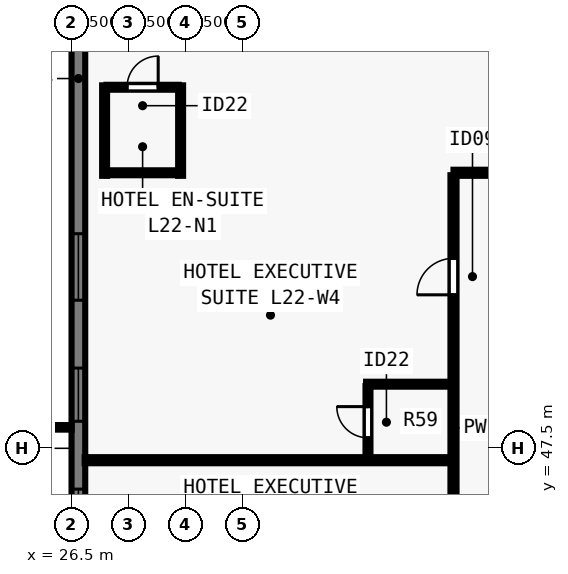
"""IFC4 building model, lengths in metres.
Left out: names, types, materials, properties, quantities, classifications, styles, units other than length and angle.
Written with IfcOpenShell. Run it as: python <this file> out.ifc"""

import sys

from ifc_helpers import new_model, si_unit, direction, frame, frame_2d, origin, place, context, subcontext, project, spatial, rectangle, extrude, element, fill, save


model = new_model("IFC4")
c1 = context("Model", 3, precision=1e-05, world=origin(), true_north=direction((0.0, 1.0)))
c2 = subcontext(c1, "Body", "Model", "MODEL_VIEW")
j1 = project(units=[si_unit("LENGTHUNIT", "METRE"), si_unit("PLANEANGLEUNIT", "RADIAN")], contexts=[c1])
p1 = place(None, origin())
s1 = spatial("IfcSite", under=j1, at=p1, CompositionType="ELEMENT")
p2 = place(p1, origin())
s2 = spatial("IfcBuilding", under=s1, at=p2, CompositionType="ELEMENT")
p3 = place(p2, frame((0.0, 0.0, 83.0)))
s3 = spatial("IfcBuildingStorey", under=s2, at=p3, CompositionType="ELEMENT", Elevation=83.0)
p4 = place(p3, frame((26.68, 16.5, 0.0), z_axis=(0.0, 0.0, 1.0), x_axis=(0.0, 1.0, 0.0)))
e1 = element("IfcWall", 1, at=p4, inside=s3, PredefinedType="SOLIDWALL", context=c2, shape_type="SweptSolid", body=[
    extrude(rectangle(XDim=44.662, YDim=0.36, at=frame_2d((22.331, 0.0))), origin(), (0.0, 0.0, 1.0), 3.28),
])
p5 = place(p4, frame((4.83, 0.0, 0.8)))
e2 = element("IfcOpeningElement", 2, at=p5, cuts=e1, PredefinedType="OPENING", context=c2, shape_type="SweptSolid", body=[
    extrude(rectangle(XDim=1.4, YDim=1.544, at=frame_2d((0.7, 0.772))), frame((0.0, 0.19, 0.0), z_axis=(0.0, -1.0, 0.0), x_axis=(1.0, 0.0, 0.0)), (0.0, 0.0, 1.0), 0.38),
])
p6 = place(p4, frame((8.015, 0.0, 0.8)))
e3 = element("IfcOpeningElement", 3, at=p6, cuts=e1, PredefinedType="OPENING", context=c2, shape_type="SweptSolid", body=[
    extrude(rectangle(XDim=1.75, YDim=1.544, at=frame_2d((0.875, 0.772))), frame((0.0, 0.19, 0.0), z_axis=(0.0, -1.0, 0.0), x_axis=(1.0, 0.0, 0.0)), (0.0, 0.0, 1.0), 0.38),
])
p7 = place(p4, frame((11.551, 0.0, 0.8)))
e4 = element("IfcOpeningElement", 4, at=p7, cuts=e1, PredefinedType="OPENING", context=c2, shape_type="SweptSolid", body=[
    extrude(rectangle(XDim=1.4, YDim=1.544, at=frame_2d((0.7, 0.772))), frame((0.0, 0.19, 0.0), z_axis=(0.0, -1.0, 0.0), x_axis=(1.0, 0.0, 0.0)), (0.0, 0.0, 1.0), 0.38),
])
p8 = place(p4, frame((18.721, 0.0, 0.8)))
e5 = element("IfcOpeningElement", 5, at=p8, cuts=e1, PredefinedType="OPENING", context=c2, shape_type="SweptSolid", body=[
    extrude(rectangle(XDim=1.4, YDim=1.544, at=frame_2d((0.7, 0.772))), frame((0.0, 0.19, 0.0), z_axis=(0.0, -1.0, 0.0), x_axis=(1.0, 0.0, 0.0)), (0.0, 0.0, 1.0), 0.38),
])
p9 = place(p4, frame((22.706, 0.0, 0.8)))
e6 = element("IfcOpeningElement", 6, at=p9, cuts=e1, PredefinedType="OPENING", context=c2, shape_type="SweptSolid", body=[
    extrude(rectangle(XDim=1.75, YDim=1.544, at=frame_2d((0.875, 0.772))), frame((0.0, 0.19, 0.0), z_axis=(0.0, -1.0, 0.0), x_axis=(1.0, 0.0, 0.0)), (0.0, 0.0, 1.0), 0.38),
])
p10 = place(p4, frame((24.991, 0.0, 0.8)))
e7 = element("IfcOpeningElement", 7, at=p10, cuts=e1, PredefinedType="OPENING", context=c2, shape_type="SweptSolid", body=[
    extrude(rectangle(XDim=1.4, YDim=1.544, at=frame_2d((0.7, 0.772))), frame((0.0, 0.19, 0.0), z_axis=(0.0, -1.0, 0.0), x_axis=(1.0, 0.0, 0.0)), (0.0, 0.0, 1.0), 0.38),
])
p11 = place(p4, frame((28.177, 0.0, 0.8)))
e8 = element("IfcOpeningElement", 8, at=p11, cuts=e1, PredefinedType="OPENING", context=c2, shape_type="SweptSolid", body=[
    extrude(rectangle(XDim=1.75, YDim=1.544, at=frame_2d((0.875, 0.772))), frame((0.0, 0.19, 0.0), z_axis=(0.0, -1.0, 0.0), x_axis=(1.0, 0.0, 0.0)), (0.0, 0.0, 1.0), 0.38),
])
p12 = place(p4, frame((31.711, 0.0, 0.8)))
e9 = element("IfcOpeningElement", 9, at=p12, cuts=e1, PredefinedType="OPENING", context=c2, shape_type="SweptSolid", body=[
    extrude(rectangle(XDim=1.4, YDim=1.544, at=frame_2d((0.7, 0.772))), frame((0.0, 0.19, 0.0), z_axis=(0.0, -1.0, 0.0), x_axis=(1.0, 0.0, 0.0)), (0.0, 0.0, 1.0), 0.38),
])
p13 = place(p4, frame((34.897, 0.0, 0.8)))
e10 = element("IfcOpeningElement", 10, at=p13, cuts=e1, PredefinedType="OPENING", context=c2, shape_type="SweptSolid", body=[
    extrude(rectangle(XDim=1.75, YDim=1.544, at=frame_2d((0.875, 0.772))), frame((0.0, 0.19, 0.0), z_axis=(0.0, -1.0, 0.0), x_axis=(1.0, 0.0, 0.0)), (0.0, 0.0, 1.0), 0.38),
])
p14 = place(p3, frame((36.55, 54.75, 0.0), z_axis=(0.0, 0.0, 1.0), x_axis=(1.0, 0.0, 0.0)))
e11 = element("IfcWall", 11, at=p14, inside=s3, PredefinedType="PARTITIONING", context=c2, shape_type="SweptSolid", body=[
    extrude(rectangle(XDim=30.9, YDim=0.16, at=frame_2d((15.45, 0.0))), origin(), (0.0, 0.0, 1.0), 3.28),
])
p15 = place(p14, frame((2.83, 0.0, 0.0)))
e12 = element("IfcOpeningElement", 12, at=p15, cuts=e11, PredefinedType="OPENING", context=c2, shape_type="SweptSolid", body=[
    extrude(rectangle(XDim=0.96, YDim=2.15, at=frame_2d((0.48, 1.075))), frame((0.0, 0.09, 0.0), z_axis=(0.0, -1.0, 0.0), x_axis=(1.0, 0.0, 0.0)), (0.0, 0.0, 1.0), 0.18),
])
p16 = place(p14, frame((15.965, 0.0, 0.0)))
e13 = element("IfcOpeningElement", 13, at=p16, cuts=e11, PredefinedType="OPENING", context=c2, shape_type="SweptSolid", body=[
    extrude(rectangle(XDim=0.96, YDim=2.15, at=frame_2d((0.48, 1.075))), frame((0.0, 0.09, 0.0), z_axis=(0.0, -1.0, 0.0), x_axis=(1.0, 0.0, 0.0)), (0.0, 0.0, 1.0), 0.18),
])
p17 = place(p14, frame((28.105, 0.0, 0.0)))
e14 = element("IfcOpeningElement", 14, at=p17, cuts=e11, PredefinedType="OPENING", context=c2, shape_type="SweptSolid", body=[
    extrude(rectangle(XDim=0.96, YDim=2.15, at=frame_2d((0.48, 1.075))), frame((0.0, 0.09, 0.0), z_axis=(0.0, -1.0, 0.0), x_axis=(1.0, 0.0, 0.0)), (0.0, 0.0, 1.0), 0.18),
])
p18 = place(p3, frame((36.55, 23.315, 0.0), z_axis=(0.0, 0.0, 1.0), x_axis=(0.0, 1.0, 0.0)))
e15 = element("IfcWall", 15, at=p18, inside=s3, PredefinedType="PARTITIONING", context=c2, shape_type="SweptSolid", body=[
    extrude(rectangle(XDim=31.37, YDim=0.16, at=frame_2d((15.685, 0.0))), origin(), (0.0, 0.0, 1.0), 3.28),
])
p19 = place(p18, frame((4.848, 0.0, 0.0)))
e16 = element("IfcOpeningElement", 16, at=p19, cuts=e15, PredefinedType="OPENING", context=c2, shape_type="SweptSolid", body=[
    extrude(rectangle(XDim=0.96, YDim=2.15, at=frame_2d((0.48, 1.075))), frame((0.0, 0.09, 0.0), z_axis=(0.0, -1.0, 0.0), x_axis=(1.0, 0.0, 0.0)), (0.0, 0.0, 1.0), 0.18),
])
p20 = place(p18, frame((12.39, 0.0, 0.0)))
e17 = element("IfcOpeningElement", 17, at=p20, cuts=e15, PredefinedType="OPENING", context=c2, shape_type="SweptSolid", body=[
    extrude(rectangle(XDim=0.96, YDim=2.15, at=frame_2d((0.48, 1.075))), frame((0.0, 0.09, 0.0), z_axis=(0.0, -1.0, 0.0), x_axis=(1.0, 0.0, 0.0)), (0.0, 0.0, 1.0), 0.18),
])
p21 = place(p18, frame((20.265, 0.0, 0.0)))
e18 = element("IfcOpeningElement", 18, at=p21, cuts=e15, PredefinedType="OPENING", context=c2, shape_type="SweptSolid", body=[
    extrude(rectangle(XDim=0.96, YDim=2.15, at=frame_2d((0.48, 1.075))), frame((0.0, 0.09, 0.0), z_axis=(0.0, -1.0, 0.0), x_axis=(1.0, 0.0, 0.0)), (0.0, 0.0, 1.0), 0.18),
])
p22 = place(p18, frame((28.223, 0.0, 0.0)))
e19 = element("IfcOpeningElement", 19, at=p22, cuts=e15, PredefinedType="OPENING", context=c2, shape_type="SweptSolid", body=[
    extrude(rectangle(XDim=0.96, YDim=2.15, at=frame_2d((0.48, 1.075))), frame((0.0, 0.09, 0.0), z_axis=(0.0, -1.0, 0.0), x_axis=(1.0, 0.0, 0.0)), (0.0, 0.0, 1.0), 0.18),
])
for number, where, z_axis, x_axis in (
    (20, (27.37, 54.67, 0.0), (0.0, 0.0, 1.0), (0.0, 1.0, 0.0)),
    (21, (29.37, 54.67, 0.0), (0.0, 0.0, 1.0), (0.0, 1.0, 0.0)),
):
    element("IfcWall", number, at=place(p3, frame(where, z_axis=z_axis, x_axis=x_axis)), inside=s3, PredefinedType="PLUMBINGWALL", context=c2, shape_type="SweptSolid", body=[
        extrude(rectangle(XDim=2.38, YDim=0.13, at=frame_2d((1.19, 0.0))), origin(), (0.0, 0.0, 1.0), 3.28),
    ])
p23 = place(p3, frame((27.42, 57.0, 0.0), z_axis=(0.0, 0.0, 1.0), x_axis=(1.0, 0.0, 0.0)))
e22 = element("IfcWall", 22, at=p23, inside=s3, PredefinedType="PLUMBINGWALL", context=c2, shape_type="SweptSolid", body=[
    extrude(rectangle(XDim=1.9, YDim=0.13, at=frame_2d((0.95, 0.0))), origin(), (0.0, 0.0, 1.0), 3.28),
])
p24 = place(p23, frame((0.54, 0.0, 0.0)))
e23 = element("IfcOpeningElement", 23, at=p24, cuts=e22, PredefinedType="OPENING", context=c2, shape_type="SweptSolid", body=[
    extrude(rectangle(XDim=0.82, YDim=2.1, at=frame_2d((0.41, 1.05))), frame((0.0, 0.075, 0.0), z_axis=(0.0, -1.0, 0.0), x_axis=(1.0, 0.0, 0.0)), (0.0, 0.0, 1.0), 0.15),
])
p25 = place(p3, frame((27.42, 54.75, 0.0), z_axis=(0.0, 0.0, 1.0), x_axis=(1.0, 0.0, 0.0)))
e24 = element("IfcWall", 24, at=p25, inside=s3, PredefinedType="PLUMBINGWALL", context=c2, shape_type="SweptSolid", body=[
    extrude(rectangle(XDim=1.9, YDim=0.13, at=frame_2d((0.95, 0.0))), origin(), (0.0, 0.0, 1.0), 3.28),
])
p26 = place(p3, frame((26.845, 47.187, 0.0), z_axis=(0.0, 0.0, 1.0), x_axis=(1.0, 0.0, 0.0)))
e25 = element("IfcWall", 25, at=p26, inside=s3, PredefinedType="PARTITIONING", context=c2, shape_type="SweptSolid", body=[
    extrude(rectangle(XDim=9.64, YDim=0.16, at=frame_2d((4.82, 0.0))), origin(), (0.0, 0.0, 1.0), 3.28),
])
p27 = place(p3, frame((34.25, 49.187, 0.0), z_axis=(0.0, 0.0, 1.0), x_axis=(1.0, 0.0, 0.0)))
e26 = element("IfcWall", 26, at=p27, inside=s3, PredefinedType="PLUMBINGWALL", context=c2, shape_type="SweptSolid", body=[
    extrude(rectangle(XDim=2.235, YDim=0.13, at=frame_2d((1.118, 0.0))), origin(), (0.0, 0.0, 1.0), 3.28),
])
p28 = place(p3, frame((34.3, 47.252, 0.0), z_axis=(0.0, 0.0, 1.0), x_axis=(0.0, 1.0, 0.0)))
e27 = element("IfcWall", 27, at=p28, inside=s3, PredefinedType="PLUMBINGWALL", context=c2, shape_type="SweptSolid", body=[
    extrude(rectangle(XDim=1.885, YDim=0.13, at=frame_2d((0.942, 0.0))), origin(), (0.0, 0.0, 1.0), 3.28),
])
p29 = place(p28, frame((0.525, 0.0, 0.0)))
e28 = element("IfcOpeningElement", 28, at=p29, cuts=e27, PredefinedType="OPENING", context=c2, shape_type="SweptSolid", body=[
    extrude(rectangle(XDim=0.82, YDim=2.1, at=frame_2d((0.41, 1.05))), frame((0.0, 0.075, 0.0), z_axis=(0.0, -1.0, 0.0), x_axis=(1.0, 0.0, 0.0)), (0.0, 0.0, 1.0), 0.15),
])
p30 = place(p11, origin())
e29 = element("IfcWindow", 29, at=p30, inside=s3, PartitioningType="SINGLE_PANEL", PredefinedType="WINDOW", context=c2, shape_type="SweptSolid", body=[
    extrude(rectangle(XDim=1.75, YDim=1.544, at=frame_2d((0.875, 0.772))), frame((0.0, -0.05, 0.0), z_axis=(0.0, -1.0, 0.0), x_axis=(1.0, 0.0, 0.0)), (0.0, 0.0, 1.0), 0.06),
])
fill(e8, e29)
p31 = place(p12, origin())
e30 = element("IfcWindow", 30, at=p31, inside=s3, PartitioningType="SINGLE_PANEL", PredefinedType="WINDOW", context=c2, shape_type="SweptSolid", body=[
    extrude(rectangle(XDim=1.4, YDim=1.544, at=frame_2d((0.7, 0.772))), frame((0.0, -0.05, 0.0), z_axis=(0.0, -1.0, 0.0), x_axis=(1.0, 0.0, 0.0)), (0.0, 0.0, 1.0), 0.06),
])
fill(e9, e30)
p32 = place(p13, origin())
e31 = element("IfcWindow", 31, at=p32, inside=s3, PartitioningType="SINGLE_PANEL", PredefinedType="WINDOW", context=c2, shape_type="SweptSolid", body=[
    extrude(rectangle(XDim=1.75, YDim=1.544, at=frame_2d((0.875, 0.772))), frame((0.0, -0.05, 0.0), z_axis=(0.0, -1.0, 0.0), x_axis=(1.0, 0.0, 0.0)), (0.0, 0.0, 1.0), 0.06),
])
fill(e10, e31)
p33 = place(p24, origin())
e32 = element("IfcDoor", 32, at=p33, inside=s3, OperationType="SINGLE_SWING_RIGHT", PredefinedType="DOOR", context=c2, shape_type="SweptSolid", body=[
    extrude(rectangle(XDim=0.82, YDim=2.1, at=frame_2d((0.41, 1.05))), frame((0.0, 0.025, 0.0), z_axis=(0.0, -1.0, 0.0), x_axis=(1.0, 0.0, 0.0)), (0.0, 0.0, 1.0), 0.05),
])
fill(e23, e32)
p34 = place(p29, origin())
e33 = element("IfcDoor", 33, at=p34, inside=s3, OperationType="SINGLE_SWING_RIGHT", PredefinedType="DOOR", context=c2, shape_type="SweptSolid", body=[
    extrude(rectangle(XDim=0.82, YDim=2.1, at=frame_2d((0.41, 1.05))), frame((0.0, 0.025, 0.0), z_axis=(0.0, -1.0, 0.0), x_axis=(1.0, 0.0, 0.0)), (0.0, 0.0, 1.0), 0.05),
])
fill(e28, e33)
p35 = place(p22, origin())
e34 = element("IfcDoor", 34, at=p35, inside=s3, OperationType="SINGLE_SWING_LEFT", PredefinedType="DOOR", context=c2, shape_type="SweptSolid", body=[
    extrude(rectangle(XDim=0.96, YDim=2.15, at=frame_2d((0.48, 1.075))), frame((0.0, 0.025, 0.0), z_axis=(0.0, -1.0, 0.0), x_axis=(1.0, 0.0, 0.0)), (0.0, 0.0, 1.0), 0.05),
])
fill(e19, e34)
save(model, sys.argv[1])
